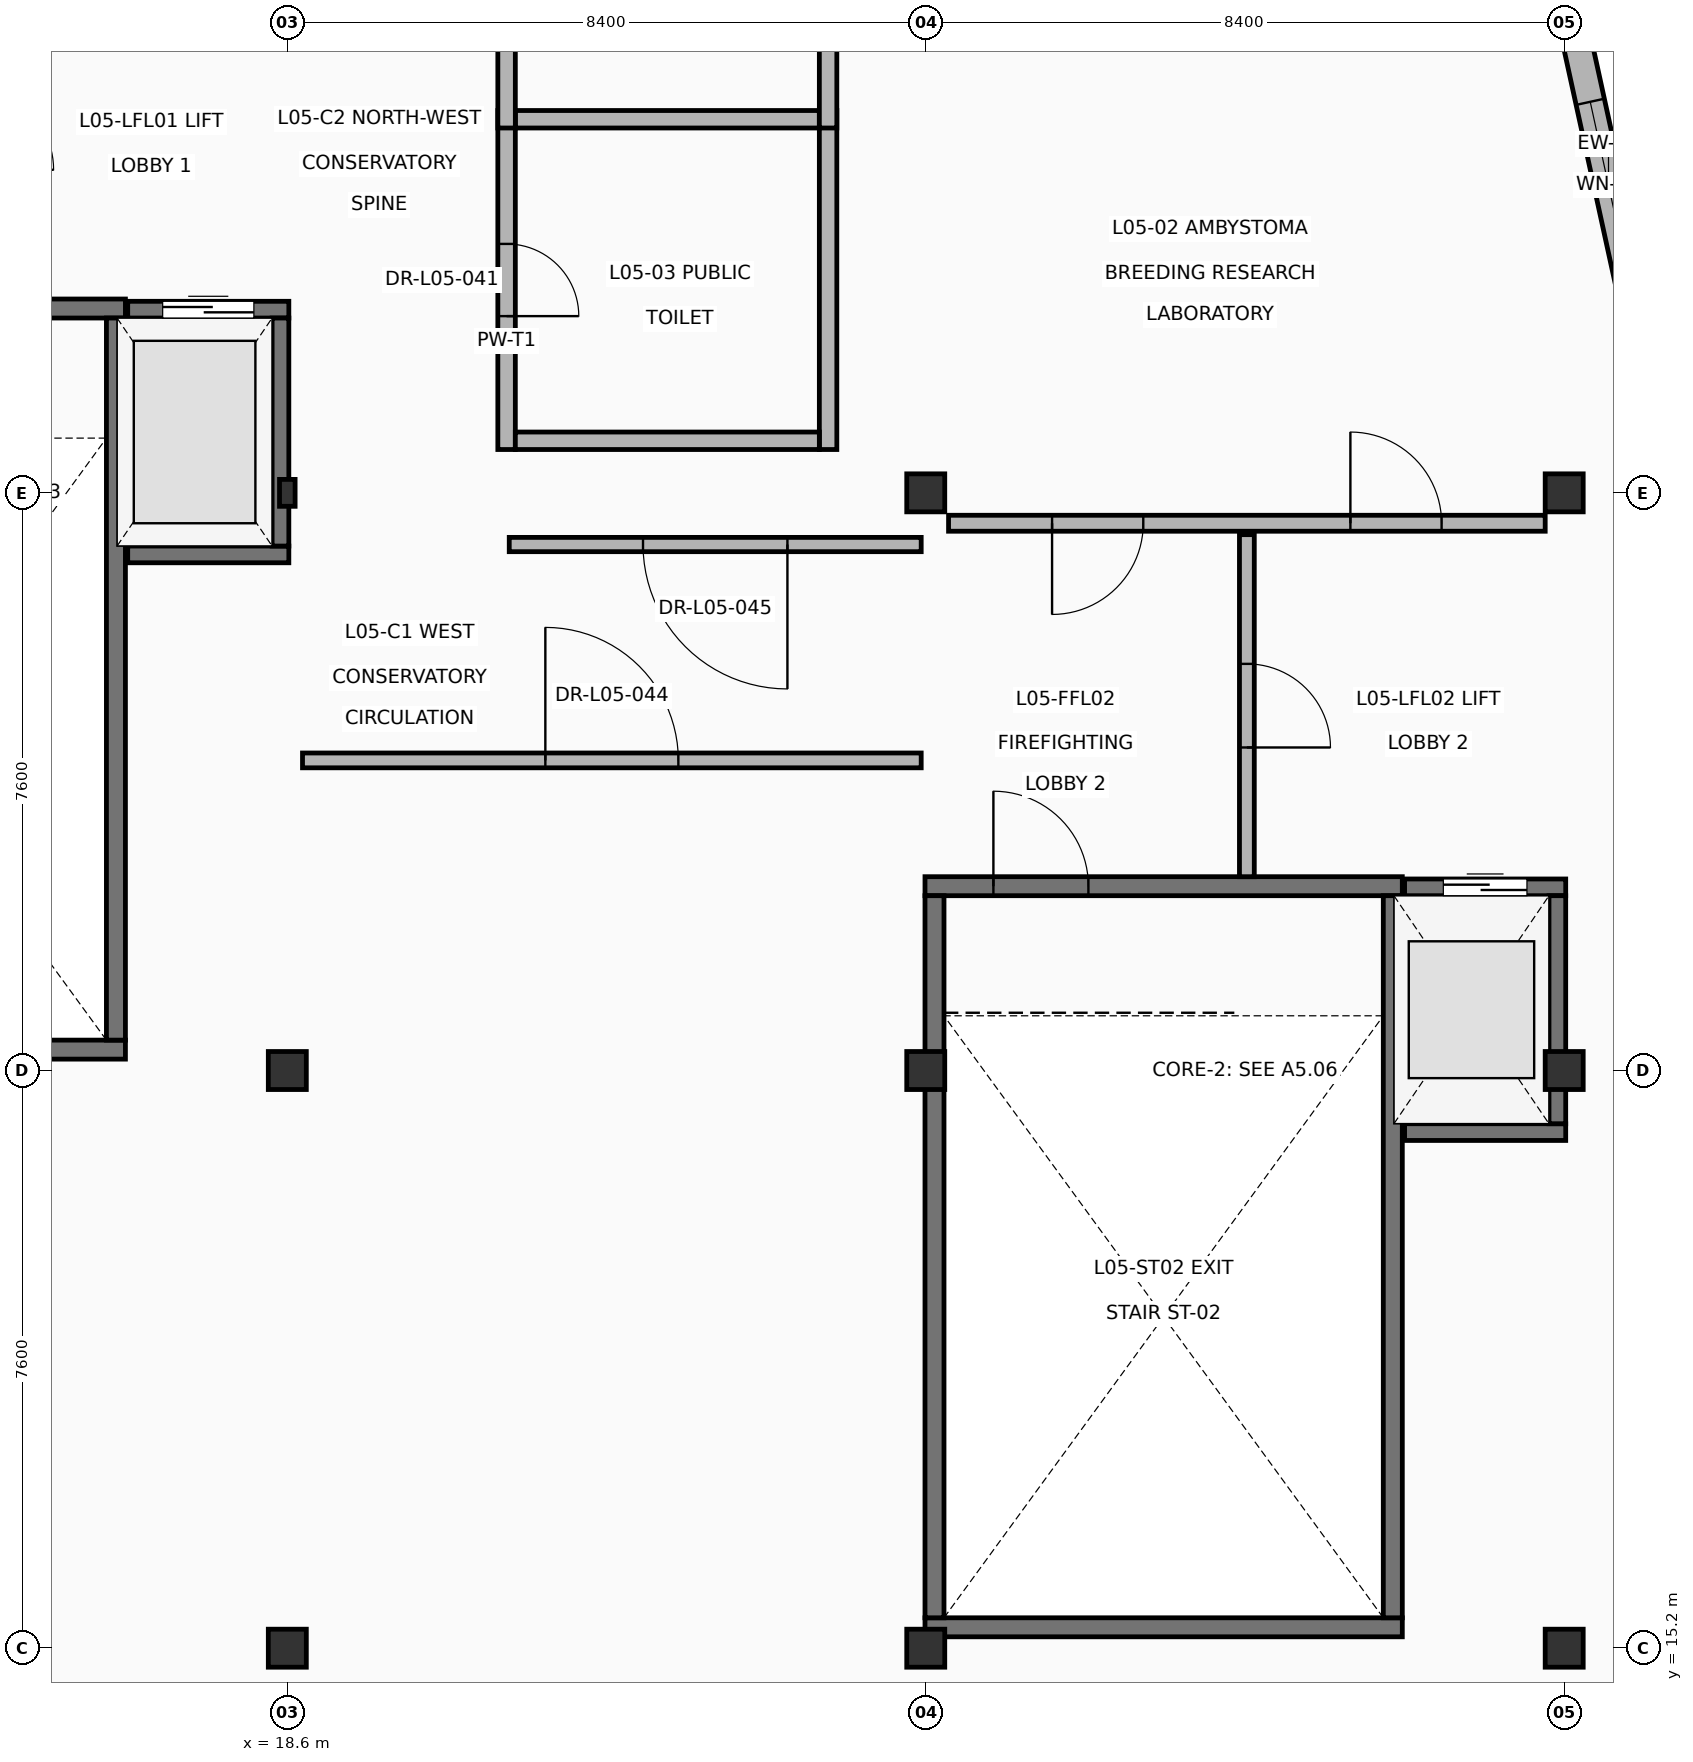
"""IFC4 building model, lengths in metres.
Left out: names, types, materials, properties, quantities, classifications, styles, units other than length and angle.
Written with IfcOpenShell. Run it as: python <this file> out.ifc"""

import sys

from ifc_helpers import new_model, si_unit, direction, frame, frame_2d, origin, origin_2d, place, context, subcontext, project, spatial, rectangle, i_section, extrude, element, fill, save


model = new_model("IFC4")
c1 = context("Model", 3, precision=1e-05, world=origin(), true_north=direction((0.0, 1.0)))
c2 = subcontext(c1, "Body", "Model", "MODEL_VIEW")
j1 = project(units=[si_unit("LENGTHUNIT", "METRE"), si_unit("PLANEANGLEUNIT", "RADIAN")], contexts=[c1])
p1 = place(None, origin())
s1 = spatial("IfcSite", under=j1, at=p1, CompositionType="ELEMENT")
p2 = place(p1, origin())
s2 = spatial("IfcBuilding", under=s1, at=p2, CompositionType="ELEMENT")
p3 = place(p2, frame((0.0, 0.0, 19.8)))
s3 = spatial("IfcBuildingStorey", under=s2, at=p3, CompositionType="ELEMENT", Elevation=19.8)
for number, where, z_axis, x_axis in (
    (1, (18.6, 15.2, 0.0), (0.0, 0.0, 1.0), (1.0, 0.0, 0.0)),
    (2, (18.6, 22.8, 0.0), (0.0, 0.0, 1.0), (1.0, 0.0, 0.0)),
):
    element("IfcColumn", number, at=place(p3, frame(where, z_axis=z_axis, x_axis=x_axis)), inside=s3, PredefinedType="COLUMN", context=c2, shape_type="SweptSolid", body=[
        extrude(rectangle(XDim=0.5, YDim=0.5, at=origin_2d()), origin(), (0.0, 0.0, 1.0), 4.2),
    ])
p4 = place(p3, frame((18.6, 30.4, 0.0), z_axis=(0.0, 0.0, 1.0), x_axis=(1.0, 0.0, 0.0)))
e3 = element("IfcColumn", 3, at=p4, inside=s3, PredefinedType="COLUMN", context=c2, shape_type="SweptSolid", body=[
    extrude(i_section(OverallWidth=0.205, OverallDepth=0.354, WebThickness=0.01, FlangeThickness=0.017, at=origin_2d()), origin(), (0.0, 0.0, 1.0), 4.2),
])
for number, where, z_axis, x_axis in (
    (4, (27.0, 15.2, 0.0), (0.0, 0.0, 1.0), (1.0, 0.0, 0.0)),
    (5, (27.0, 22.8, 0.0), (0.0, 0.0, 1.0), (1.0, 0.0, 0.0)),
    (6, (27.0, 30.4, 0.0), (0.0, 0.0, 1.0), (1.0, 0.0, 0.0)),
    (7, (35.4, 15.2, 0.0), (0.0, 0.0, 1.0), (1.0, 0.0, 0.0)),
    (8, (35.4, 22.8, 0.0), (0.0, 0.0, 1.0), (1.0, 0.0, 0.0)),
    (9, (35.4, 30.4, 0.0), (0.0, 0.0, 1.0), (1.0, 0.0, 0.0)),
):
    element("IfcColumn", number, at=place(p3, frame(where, z_axis=z_axis, x_axis=x_axis)), inside=s3, PredefinedType="COLUMN", context=c2, shape_type="SweptSolid", body=[
        extrude(rectangle(XDim=0.5, YDim=0.5, at=origin_2d()), origin(), (0.0, 0.0, 1.0), 4.2),
    ])
p5 = place(p3, frame((35.275, 37.683, 0.0), z_axis=(0.0, 0.0, 1.0), x_axis=(0.213637559437, -0.976912991621, 0.0)))
e10 = element("IfcWall", 10, at=p5, inside=s3, PredefinedType="SOLIDWALL", context=c2, shape_type="SweptSolid", body=[
    extrude(rectangle(XDim=6.628, YDim=0.38, at=frame_2d((3.314, 0.0))), origin(), (0.0, 0.0, 1.0), 3.96),
])
p6 = place(p5, frame((2.189, 0.0, 0.95)))
e11 = element("IfcOpeningElement", 11, at=p6, cuts=e10, PredefinedType="OPENING", context=c2, shape_type="SweptSolid", body=[
    extrude(rectangle(XDim=2.25, YDim=2.15, at=frame_2d((1.125, 1.075))), frame((0.0, 0.2, 0.0), z_axis=(0.0, -1.0, 0.0), x_axis=(1.0, 0.0, 0.0)), (0.0, 0.0, 1.0), 0.4),
])
p7 = place(p3, frame((10.19, 23.075, 0.0), z_axis=(0.0, 0.0, 1.0), x_axis=(1.0, 0.0, 0.0)))
e12 = element("IfcWall", 12, at=p7, inside=s3, PredefinedType="SHEAR", context=c2, shape_type="SweptSolid", body=[
    extrude(rectangle(XDim=6.28, YDim=0.25, at=frame_2d((3.14, 0.0))), origin(), (0.0, 0.0, 1.0), 3.96),
])
p8 = place(p3, frame((10.19, 32.825, 0.0), z_axis=(0.0, 0.0, 1.0), x_axis=(1.0, 0.0, 0.0)))
e13 = element("IfcWall", 13, at=p8, inside=s3, PredefinedType="SHEAR", context=c2, shape_type="SweptSolid", body=[
    extrude(rectangle(XDim=6.28, YDim=0.25, at=frame_2d((3.14, 0.0))), origin(), (0.0, 0.0, 1.0), 3.96),
])
p9 = place(p8, frame((0.9, 0.0, 0.0)))
e14 = element("IfcOpeningElement", 14, at=p9, cuts=e13, PredefinedType="OPENING", context=c2, shape_type="SweptSolid", body=[
    extrude(rectangle(XDim=1.25, YDim=2.2, at=frame_2d((0.625, 1.1))), frame((0.0, 0.135, 0.0), z_axis=(0.0, -1.0, 0.0), x_axis=(1.0, 0.0, 0.0)), (0.0, 0.0, 1.0), 0.27),
])
p10 = place(p3, frame((16.345, 23.2, 0.0), z_axis=(0.0, 0.0, 1.0), x_axis=(0.0, 1.0, 0.0)))
e15 = element("IfcWall", 15, at=p10, inside=s3, PredefinedType="SHEAR", context=c2, shape_type="SweptSolid", body=[
    extrude(rectangle(XDim=9.5, YDim=0.25, at=frame_2d((4.75, 0.0))), origin(), (0.0, 0.0, 1.0), 3.96),
])
p11 = place(p3, frame((16.5, 29.59, 0.0), z_axis=(0.0, 0.0, 1.0), x_axis=(1.0, 0.0, 0.0)))
e16 = element("IfcWall", 16, at=p11, inside=s3, PredefinedType="SHEAR", context=c2, shape_type="SweptSolid", body=[
    extrude(rectangle(XDim=2.12, YDim=0.22, at=frame_2d((1.06, 0.0))), origin(), (0.0, 0.0, 1.0), 3.96),
])
p12 = place(p3, frame((16.5, 32.81, 0.0), z_axis=(0.0, 0.0, 1.0), x_axis=(1.0, 0.0, 0.0)))
e17 = element("IfcWall", 17, at=p12, inside=s3, PredefinedType="SHEAR", context=c2, shape_type="SweptSolid", body=[
    extrude(rectangle(XDim=2.12, YDim=0.22, at=frame_2d((1.06, 0.0))), origin(), (0.0, 0.0, 1.0), 3.96),
])
p13 = place(p12, frame((0.46, 0.0, 0.0)))
e18 = element("IfcOpeningElement", 18, at=p13, cuts=e17, PredefinedType="OPENING", context=c2, shape_type="SweptSolid", body=[
    extrude(rectangle(XDim=1.2, YDim=2.2, at=frame_2d((0.6, 1.1))), frame((0.0, 0.12, 0.0), z_axis=(0.0, -1.0, 0.0), x_axis=(1.0, 0.0, 0.0)), (0.0, 0.0, 1.0), 0.24),
])
p14 = place(p3, frame((18.51, 29.7, 0.0), z_axis=(0.0, 0.0, 1.0), x_axis=(0.0, 1.0, 0.0)))
e19 = element("IfcWall", 19, at=p14, inside=s3, PredefinedType="SHEAR", context=c2, shape_type="SweptSolid", body=[
    extrude(rectangle(XDim=3.0, YDim=0.22, at=frame_2d((1.5, 0.0))), origin(), (0.0, 0.0, 1.0), 3.96),
])
p15 = place(p3, frame((26.99, 15.475, 0.0), z_axis=(0.0, 0.0, 1.0), x_axis=(1.0, 0.0, 0.0)))
e20 = element("IfcWall", 20, at=p15, inside=s3, PredefinedType="SHEAR", context=c2, shape_type="SweptSolid", body=[
    extrude(rectangle(XDim=6.28, YDim=0.25, at=frame_2d((3.14, 0.0))), origin(), (0.0, 0.0, 1.0), 3.96),
])
p16 = place(p3, frame((26.99, 25.225, 0.0), z_axis=(0.0, 0.0, 1.0), x_axis=(1.0, 0.0, 0.0)))
e21 = element("IfcWall", 21, at=p16, inside=s3, PredefinedType="SHEAR", context=c2, shape_type="SweptSolid", body=[
    extrude(rectangle(XDim=6.28, YDim=0.25, at=frame_2d((3.14, 0.0))), origin(), (0.0, 0.0, 1.0), 3.96),
])
p17 = place(p16, frame((0.9, 0.0, 0.0)))
e22 = element("IfcOpeningElement", 22, at=p17, cuts=e21, PredefinedType="OPENING", context=c2, shape_type="SweptSolid", body=[
    extrude(rectangle(XDim=1.25, YDim=2.2, at=frame_2d((0.625, 1.1))), frame((0.0, 0.135, 0.0), z_axis=(0.0, -1.0, 0.0), x_axis=(1.0, 0.0, 0.0)), (0.0, 0.0, 1.0), 0.27),
])
for number, where, z_axis, x_axis in (
    (23, (27.115, 15.6, 0.0), (0.0, 0.0, 1.0), (0.0, 1.0, 0.0)),
    (24, (33.145, 15.6, 0.0), (0.0, 0.0, 1.0), (0.0, 1.0, 0.0)),
):
    element("IfcWall", number, at=place(p3, frame(where, z_axis=z_axis, x_axis=x_axis)), inside=s3, PredefinedType="SHEAR", context=c2, shape_type="SweptSolid", body=[
        extrude(rectangle(XDim=9.5, YDim=0.25, at=frame_2d((4.75, 0.0))), origin(), (0.0, 0.0, 1.0), 3.96),
    ])
p18 = place(p3, frame((33.3, 21.99, 0.0), z_axis=(0.0, 0.0, 1.0), x_axis=(1.0, 0.0, 0.0)))
e25 = element("IfcWall", 25, at=p18, inside=s3, PredefinedType="SHEAR", context=c2, shape_type="SweptSolid", body=[
    extrude(rectangle(XDim=2.12, YDim=0.22, at=frame_2d((1.06, 0.0))), origin(), (0.0, 0.0, 1.0), 3.96),
])
p19 = place(p3, frame((33.3, 25.21, 0.0), z_axis=(0.0, 0.0, 1.0), x_axis=(1.0, 0.0, 0.0)))
e26 = element("IfcWall", 26, at=p19, inside=s3, PredefinedType="SHEAR", context=c2, shape_type="SweptSolid", body=[
    extrude(rectangle(XDim=2.12, YDim=0.22, at=frame_2d((1.06, 0.0))), origin(), (0.0, 0.0, 1.0), 3.96),
])
p20 = place(p19, frame((0.51, 0.0, 0.0)))
e27 = element("IfcOpeningElement", 27, at=p20, cuts=e26, PredefinedType="OPENING", context=c2, shape_type="SweptSolid", body=[
    extrude(rectangle(XDim=1.1, YDim=2.15, at=frame_2d((0.55, 1.075))), frame((0.0, 0.12, 0.0), z_axis=(0.0, -1.0, 0.0), x_axis=(1.0, 0.0, 0.0)), (0.0, 0.0, 1.0), 0.24),
])
p21 = place(p3, frame((35.31, 22.1, 0.0), z_axis=(0.0, 0.0, 1.0), x_axis=(0.0, 1.0, 0.0)))
e28 = element("IfcWall", 28, at=p21, inside=s3, PredefinedType="SHEAR", context=c2, shape_type="SweptSolid", body=[
    extrude(rectangle(XDim=3.0, YDim=0.22, at=frame_2d((1.5, 0.0))), origin(), (0.0, 0.0, 1.0), 3.96),
])
p22 = place(p3, frame((27.3, 30.0, 0.0), z_axis=(0.0, 0.0, 1.0), x_axis=(1.0, 0.0, 0.0)))
e29 = element("IfcWall", 29, at=p22, inside=s3, PredefinedType="PARTITIONING", context=c2, shape_type="SweptSolid", body=[
    extrude(rectangle(XDim=7.85, YDim=0.21, at=frame_2d((3.925, 0.0))), origin(), (0.0, 0.0, 1.0), 3.96),
])
p23 = place(p22, frame((1.362, 0.0, 0.0)))
e30 = element("IfcOpeningElement", 30, at=p23, cuts=e29, PredefinedType="OPENING", context=c2, shape_type="SweptSolid", body=[
    extrude(rectangle(XDim=1.2, YDim=2.2, at=frame_2d((0.6, 1.1))), frame((0.0, 0.115, 0.0), z_axis=(0.0, -1.0, 0.0), x_axis=(1.0, 0.0, 0.0)), (0.0, 0.0, 1.0), 0.23),
])
p24 = place(p22, frame((5.287, 0.0, 0.0)))
e31 = element("IfcOpeningElement", 31, at=p24, cuts=e29, PredefinedType="OPENING", context=c2, shape_type="SweptSolid", body=[
    extrude(rectangle(XDim=1.2, YDim=2.2, at=frame_2d((0.6, 1.1))), frame((0.0, 0.115, 0.0), z_axis=(0.0, -1.0, 0.0), x_axis=(1.0, 0.0, 0.0)), (0.0, 0.0, 1.0), 0.23),
])
p25 = place(p3, frame((31.225, 25.35, 0.0), z_axis=(0.0, 0.0, 1.0), x_axis=(0.0, 1.0, 0.0)))
e32 = element("IfcWall", 32, at=p25, inside=s3, PredefinedType="PARTITIONING", context=c2, shape_type="SweptSolid", body=[
    extrude(rectangle(XDim=4.5, YDim=0.195, at=frame_2d((2.25, 0.0))), origin(), (0.0, 0.0, 1.0), 3.96),
])
p26 = place(p25, frame((1.7, 0.0, 0.0)))
e33 = element("IfcOpeningElement", 33, at=p26, cuts=e32, PredefinedType="OPENING", context=c2, shape_type="SweptSolid", body=[
    extrude(rectangle(XDim=1.1, YDim=2.15, at=frame_2d((0.55, 1.075))), frame((0.0, 0.107, 0.0), z_axis=(0.0, -1.0, 0.0), x_axis=(1.0, 0.0, 0.0)), (0.0, 0.0, 1.0), 0.215),
])
p27 = place(p3, frame((21.485, 30.97, 0.0), z_axis=(0.0, 0.0, 1.0), x_axis=(0.0, 1.0, 0.0)))
e34 = element("IfcWall", 34, at=p27, inside=s3, PredefinedType="PLUMBINGWALL", context=c2, shape_type="SweptSolid", body=[
    extrude(rectangle(XDim=4.46, YDim=0.23, at=frame_2d((2.23, 0.0))), origin(), (0.0, 0.0, 1.0), 3.95),
])
p28 = place(p27, frame((1.755, 0.0, 0.0)))
e35 = element("IfcOpeningElement", 35, at=p28, cuts=e34, PredefinedType="OPENING", context=c2, shape_type="SweptSolid", body=[
    extrude(rectangle(XDim=0.95, YDim=2.1, at=frame_2d((0.475, 1.05))), frame((0.0, 0.125, 0.0), z_axis=(0.0, -1.0, 0.0), x_axis=(1.0, 0.0, 0.0)), (0.0, 0.0, 1.0), 0.25),
])
p29 = place(p3, frame((25.715, 30.97, 0.0), z_axis=(0.0, 0.0, 1.0), x_axis=(0.0, 1.0, 0.0)))
e36 = element("IfcWall", 36, at=p29, inside=s3, PredefinedType="PLUMBINGWALL", context=c2, shape_type="SweptSolid", body=[
    extrude(rectangle(XDim=4.46, YDim=0.23, at=frame_2d((2.23, 0.0))), origin(), (0.0, 0.0, 1.0), 3.95),
])
for number, where, z_axis, x_axis in (
    (37, (21.6, 31.085, 0.0), (0.0, 0.0, 1.0), (1.0, 0.0, 0.0)),
    (38, (21.6, 35.315, 0.0), (0.0, 0.0, 1.0), (1.0, 0.0, 0.0)),
):
    element("IfcWall", number, at=place(p3, frame(where, z_axis=z_axis, x_axis=x_axis)), inside=s3, PredefinedType="PLUMBINGWALL", context=c2, shape_type="SweptSolid", body=[
        extrude(rectangle(XDim=4.0, YDim=0.23, at=frame_2d((2.0, 0.0))), origin(), (0.0, 0.0, 1.0), 3.95),
    ])
p30 = place(p3, frame((21.485, 35.2, 0.0), z_axis=(0.0, 0.0, 1.0), x_axis=(0.0, 1.0, 0.0)))
e39 = element("IfcWall", 39, at=p30, inside=s3, PredefinedType="PLUMBINGWALL", context=c2, shape_type="SweptSolid", body=[
    extrude(rectangle(XDim=4.46, YDim=0.23, at=frame_2d((2.23, 0.0))), origin(), (0.0, 0.0, 1.0), 3.95),
])
p31 = place(p30, frame((1.705, 0.0, 0.0)))
e40 = element("IfcOpeningElement", 40, at=p31, cuts=e39, PredefinedType="OPENING", context=c2, shape_type="SweptSolid", body=[
    extrude(rectangle(XDim=1.05, YDim=2.1, at=frame_2d((0.525, 1.05))), frame((0.0, 0.125, 0.0), z_axis=(0.0, -1.0, 0.0), x_axis=(1.0, 0.0, 0.0)), (0.0, 0.0, 1.0), 0.25),
])
p32 = place(p3, frame((25.715, 35.2, 0.0), z_axis=(0.0, 0.0, 1.0), x_axis=(0.0, 1.0, 0.0)))
e41 = element("IfcWall", 41, at=p32, inside=s3, PredefinedType="PLUMBINGWALL", context=c2, shape_type="SweptSolid", body=[
    extrude(rectangle(XDim=4.46, YDim=0.23, at=frame_2d((2.23, 0.0))), origin(), (0.0, 0.0, 1.0), 3.95),
])
p33 = place(p3, frame((18.8, 26.88, 0.0), z_axis=(0.0, 0.0, 1.0), x_axis=(1.0, 0.0, 0.0)))
e42 = element("IfcWall", 42, at=p33, inside=s3, PredefinedType="PARTITIONING", context=c2, shape_type="SweptSolid", body=[
    extrude(rectangle(XDim=8.14, YDim=0.195, at=frame_2d((4.07, 0.0))), origin(), (0.0, 0.0, 1.0), 3.95),
])
p34 = place(p33, frame((3.195, 0.0, 0.0)))
e43 = element("IfcOpeningElement", 43, at=p34, cuts=e42, PredefinedType="OPENING", context=c2, shape_type="SweptSolid", body=[
    extrude(rectangle(XDim=1.75, YDim=2.35, at=frame_2d((0.875, 1.175))), frame((0.0, 0.107, 0.0), z_axis=(0.0, -1.0, 0.0), x_axis=(1.0, 0.0, 0.0)), (0.0, 0.0, 1.0), 0.215),
])
p35 = place(p3, frame((26.94, 29.72, 0.0), z_axis=(0.0, 0.0, 1.0), x_axis=(-1.0, 0.0, 0.0)))
e44 = element("IfcWall", 44, at=p35, inside=s3, PredefinedType="PARTITIONING", context=c2, shape_type="SweptSolid", body=[
    extrude(rectangle(XDim=5.42, YDim=0.188, at=frame_2d((2.71, 0.0))), origin(), (0.0, 0.0, 1.0), 3.95),
])
p36 = place(p35, frame((1.76, 0.0, 0.0)))
e45 = element("IfcOpeningElement", 45, at=p36, cuts=e44, PredefinedType="OPENING", context=c2, shape_type="SweptSolid", body=[
    extrude(rectangle(XDim=1.9, YDim=2.4, at=frame_2d((0.95, 1.2))), frame((0.0, 0.104, 0.0), z_axis=(0.0, -1.0, 0.0), x_axis=(1.0, 0.0, 0.0)), (0.0, 0.0, 1.0), 0.208),
])
p37 = place(p6, origin())
e46 = element("IfcWindow", 46, at=p37, inside=s3, PartitioningType="SINGLE_PANEL", PredefinedType="WINDOW", context=c2, shape_type="SweptSolid", body=[
    extrude(rectangle(XDim=2.25, YDim=2.15, at=frame_2d((1.125, 1.075))), frame((0.0, 0.03, 0.0), z_axis=(0.0, -1.0, 0.0), x_axis=(1.0, 0.0, 0.0)), (0.0, 0.0, 1.0), 0.06),
])
fill(e11, e46)
p38 = place(p13, origin())
e47 = element("IfcDoor", 47, at=p38, inside=s3, OperationType="DOUBLE_DOOR_SLIDING", PredefinedType="DOOR", context=c2, shape_type="SweptSolid", body=[
    extrude(rectangle(XDim=1.2, YDim=2.2, at=frame_2d((0.6, 1.1))), frame((0.0, 0.025, 0.0), z_axis=(0.0, -1.0, 0.0), x_axis=(1.0, 0.0, 0.0)), (0.0, 0.0, 1.0), 0.05),
])
fill(e18, e47)
p39 = place(p17, origin())
e48 = element("IfcDoor", 48, at=p39, inside=s3, OperationType="SINGLE_SWING_LEFT", PredefinedType="DOOR", context=c2, shape_type="SweptSolid", body=[
    extrude(rectangle(XDim=1.25, YDim=2.2, at=frame_2d((0.625, 1.1))), frame((0.0, 0.025, 0.0), z_axis=(0.0, -1.0, 0.0), x_axis=(1.0, 0.0, 0.0)), (0.0, 0.0, 1.0), 0.05),
])
fill(e22, e48)
p40 = place(p20, origin())
e49 = element("IfcDoor", 49, at=p40, inside=s3, OperationType="DOUBLE_DOOR_SLIDING", PredefinedType="DOOR", context=c2, shape_type="SweptSolid", body=[
    extrude(rectangle(XDim=1.1, YDim=2.15, at=frame_2d((0.55, 1.075))), frame((0.0, 0.025, 0.0), z_axis=(0.0, -1.0, 0.0), x_axis=(1.0, 0.0, 0.0)), (0.0, 0.0, 1.0), 0.05),
])
fill(e27, e49)
p41 = place(p23, origin())
e50 = element("IfcDoor", 50, at=p41, inside=s3, OperationType="SINGLE_SWING_RIGHT", PredefinedType="DOOR", context=c2, shape_type="SweptSolid", body=[
    extrude(rectangle(XDim=1.2, YDim=2.2, at=frame_2d((0.6, 1.1))), frame((0.0, 0.025, 0.0), z_axis=(0.0, -1.0, 0.0), x_axis=(1.0, 0.0, 0.0)), (0.0, 0.0, 1.0), 0.05),
])
fill(e30, e50)
p42 = place(p24, origin())
e51 = element("IfcDoor", 51, at=p42, inside=s3, OperationType="SINGLE_SWING_LEFT", PredefinedType="DOOR", context=c2, shape_type="SweptSolid", body=[
    extrude(rectangle(XDim=1.2, YDim=2.2, at=frame_2d((0.6, 1.1))), frame((0.0, 0.025, 0.0), z_axis=(0.0, -1.0, 0.0), x_axis=(1.0, 0.0, 0.0)), (0.0, 0.0, 1.0), 0.05),
])
fill(e31, e51)
p43 = place(p26, origin())
e52 = element("IfcDoor", 52, at=p43, inside=s3, OperationType="SINGLE_SWING_RIGHT", PredefinedType="DOOR", context=c2, shape_type="SweptSolid", body=[
    extrude(rectangle(XDim=1.1, YDim=2.15, at=frame_2d((0.55, 1.075))), frame((0.0, 0.025, 0.0), z_axis=(0.0, -1.0, 0.0), x_axis=(1.0, 0.0, 0.0)), (0.0, 0.0, 1.0), 0.05),
])
fill(e33, e52)
p44 = place(p28, origin())
e53 = element("IfcDoor", 53, at=p44, inside=s3, OperationType="SINGLE_SWING_RIGHT", PredefinedType="DOOR", context=c2, shape_type="SweptSolid", body=[
    extrude(rectangle(XDim=0.95, YDim=2.1, at=frame_2d((0.475, 1.05))), frame((0.0, 0.025, 0.0), z_axis=(0.0, -1.0, 0.0), x_axis=(1.0, 0.0, 0.0)), (0.0, 0.0, 1.0), 0.05),
])
fill(e35, e53)
p45 = place(p34, origin())
e54 = element("IfcDoor", 54, at=p45, inside=s3, OperationType="DOUBLE_DOOR_SINGLE_SWING", PredefinedType="DOOR", context=c2, shape_type="SweptSolid", body=[
    extrude(rectangle(XDim=1.75, YDim=2.35, at=frame_2d((0.875, 1.175))), frame((0.0, 0.025, 0.0), z_axis=(0.0, -1.0, 0.0), x_axis=(1.0, 0.0, 0.0)), (0.0, 0.0, 1.0), 0.05),
])
fill(e43, e54)
p46 = place(p36, origin())
e55 = element("IfcDoor", 55, at=p46, inside=s3, OperationType="DOUBLE_DOOR_SINGLE_SWING", PredefinedType="DOOR", context=c2, shape_type="SweptSolid", body=[
    extrude(rectangle(XDim=1.9, YDim=2.4, at=frame_2d((0.95, 1.2))), frame((0.0, 0.025, 0.0), z_axis=(0.0, -1.0, 0.0), x_axis=(1.0, 0.0, 0.0)), (0.0, 0.0, 1.0), 0.05),
])
fill(e45, e55)
save(model, sys.argv[1])
